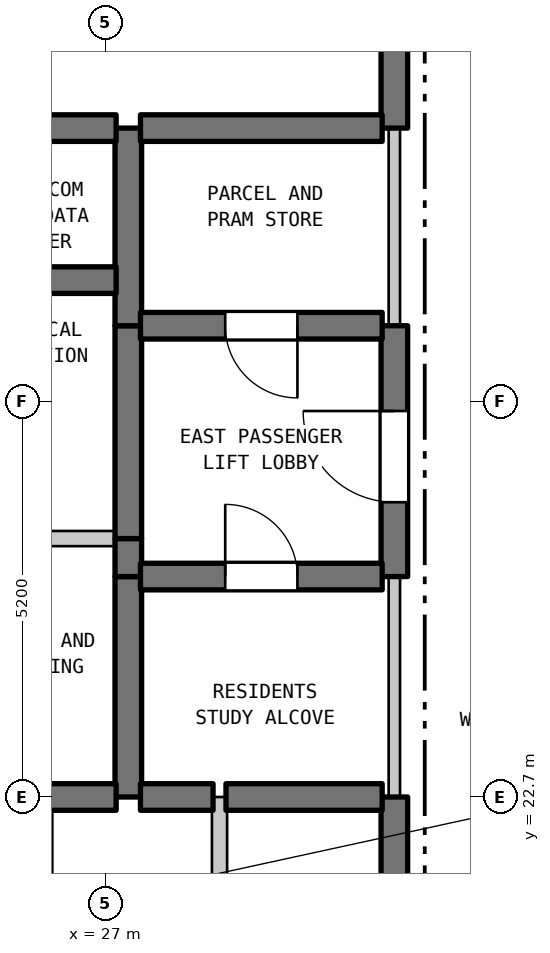
"""IFC4 building model, lengths in metres.
Left out: names, types, materials, properties, quantities, classifications, styles, units other than length and angle.
Written with IfcOpenShell. Run it as: python <this file> out.ifc"""

import sys

from ifc_helpers import new_model, si_unit, direction, frame, frame_2d, origin, place, context, subcontext, project, spatial, rectangle, extrude, element, fill, save


model = new_model("IFC4")
c1 = context("Model", 3, precision=1e-05, world=origin(), true_north=direction((0.0, 1.0)))
c2 = subcontext(c1, "Body", "Model", "MODEL_VIEW")
j1 = project(units=[si_unit("LENGTHUNIT", "METRE"), si_unit("PLANEANGLEUNIT", "RADIAN")], contexts=[c1])
p1 = place(None, origin())
s1 = spatial("IfcSite", under=j1, at=p1, CompositionType="ELEMENT")
p2 = place(p1, origin())
s2 = spatial("IfcBuilding", under=s1, at=p2, CompositionType="ELEMENT")
p3 = place(p2, frame((0.0, 0.0, 251.0)))
s3 = spatial("IfcBuildingStorey", under=s2, at=p3, CompositionType="ELEMENT", Elevation=251.0)
p4 = place(p3, frame((27.3, 22.7, 0.0), z_axis=(0.0, 0.0, 1.0), x_axis=(0.0, 1.0, 0.0)))
e1 = element("IfcWall", 1, at=p4, inside=s3, PredefinedType="SHEAR", context=c2, shape_type="SweptSolid", body=[
    extrude(rectangle(XDim=2.9, YDim=0.35, at=frame_2d((1.45, 0.0))), origin(), (0.0, 0.0, 1.0), 3.39),
])
p5 = place(p3, frame((27.3, 25.6, 0.0), z_axis=(0.0, 0.0, 1.0), x_axis=(0.0, 1.0, 0.0)))
e2 = element("IfcWall", 2, at=p5, inside=s3, PredefinedType="SHEAR", context=c2, shape_type="SweptSolid", body=[
    extrude(rectangle(XDim=0.5, YDim=0.35, at=frame_2d((0.25, 0.0))), origin(), (0.0, 0.0, 1.0), 3.39),
])
p6 = place(p3, frame((27.3, 26.1, 0.0), z_axis=(0.0, 0.0, 1.0), x_axis=(0.0, 1.0, 0.0)))
e3 = element("IfcWall", 3, at=p6, inside=s3, PredefinedType="SHEAR", context=c2, shape_type="SweptSolid", body=[
    extrude(rectangle(XDim=2.8, YDim=0.35, at=frame_2d((1.4, 0.0))), origin(), (0.0, 0.0, 1.0), 3.39),
])
p7 = place(p3, frame((27.3, 28.9, 0.0), z_axis=(0.0, 0.0, 1.0), x_axis=(0.0, 1.0, 0.0)))
e4 = element("IfcWall", 4, at=p7, inside=s3, PredefinedType="SHEAR", context=c2, shape_type="SweptSolid", body=[
    extrude(rectangle(XDim=2.6, YDim=0.35, at=frame_2d((1.3, 0.0))), origin(), (0.0, 0.0, 1.0), 3.39),
])
p8 = place(p3, frame((28.5, 19.5, 0.0), z_axis=(0.0, 0.0, 1.0), x_axis=(0.0, 1.0, 0.0)))
e5 = element("IfcWall", 5, at=p8, inside=s3, PredefinedType="STANDARD", context=c2, shape_type="SweptSolid", body=[
    extrude(rectangle(XDim=3.2, YDim=0.2, at=frame_2d((1.6, 0.0))), origin(), (0.0, 0.0, 1.0), 3.39),
])
p9 = place(p3, frame((30.8, 19.5, 0.0), z_axis=(0.0, 0.0, 1.0), x_axis=(0.0, 1.0, 0.0)))
e6 = element("IfcWall", 6, at=p9, inside=s3, PredefinedType="SHEAR", context=c2, shape_type="SweptSolid", body=[
    extrude(rectangle(XDim=3.2, YDim=0.35, at=frame_2d((1.6, 0.0))), origin(), (0.0, 0.0, 1.0), 3.39),
])
p10 = place(p3, frame((30.8, 22.7, 0.0), z_axis=(0.0, 0.0, 1.0), x_axis=(0.0, 1.0, 0.0)))
e7 = element("IfcWall", 7, at=p10, inside=s3, PredefinedType="STANDARD", context=c2, shape_type="SweptSolid", body=[
    extrude(rectangle(XDim=2.9, YDim=0.15, at=frame_2d((1.45, 0.0))), origin(), (0.0, 0.0, 1.0), 3.39),
])
p11 = place(p3, frame((30.8, 25.6, 0.0), z_axis=(0.0, 0.0, 1.0), x_axis=(0.0, 1.0, 0.0)))
e8 = element("IfcWall", 8, at=p11, inside=s3, PredefinedType="SHEAR", context=c2, shape_type="SweptSolid", body=[
    extrude(rectangle(XDim=3.3, YDim=0.35, at=frame_2d((1.65, 0.0))), origin(), (0.0, 0.0, 1.0), 3.39),
])
p12 = place(p11, frame((0.978, 0.0, 0.0)))
e9 = element("IfcOpeningElement", 9, at=p12, cuts=e8, PredefinedType="OPENING", context=c2, shape_type="SweptSolid", body=[
    extrude(rectangle(XDim=1.2, YDim=2.2, at=frame_2d((0.6, 1.1))), frame((0.0, 0.185, 0.0), z_axis=(0.0, -1.0, 0.0), x_axis=(1.0, 0.0, 0.0)), (0.0, 0.0, 1.0), 0.37),
])
p13 = place(p3, frame((30.8, 28.9, 0.0), z_axis=(0.0, 0.0, 1.0), x_axis=(0.0, 1.0, 0.0)))
e10 = element("IfcWall", 10, at=p13, inside=s3, PredefinedType="STANDARD", context=c2, shape_type="SweptSolid", body=[
    extrude(rectangle(XDim=2.6, YDim=0.15, at=frame_2d((1.3, 0.0))), origin(), (0.0, 0.0, 1.0), 3.39),
])
p14 = place(p3, frame((30.8, 31.5, 0.0), z_axis=(0.0, 0.0, 1.0), x_axis=(0.0, 1.0, 0.0)))
e11 = element("IfcWall", 11, at=p14, inside=s3, PredefinedType="SHEAR", context=c2, shape_type="SweptSolid", body=[
    extrude(rectangle(XDim=3.5, YDim=0.35, at=frame_2d((1.75, 0.0))), origin(), (0.0, 0.0, 1.0), 3.39),
])
p15 = place(p14, frame((1.15, 0.0, 0.0)))
e12 = element("IfcOpeningElement", 12, at=p15, cuts=e11, PredefinedType="OPENING", context=c2, shape_type="SweptSolid", body=[
    extrude(rectangle(XDim=1.2, YDim=2.2, at=frame_2d((0.6, 1.1))), frame((0.0, 0.185, 0.0), z_axis=(0.0, -1.0, 0.0), x_axis=(1.0, 0.0, 0.0)), (0.0, 0.0, 1.0), 0.37),
])
p16 = place(p3, frame((23.96, 22.7, 0.0), z_axis=(0.0, 0.0, 1.0), x_axis=(1.0, 0.0, 0.0)))
e13 = element("IfcWall", 13, at=p16, inside=s3, PredefinedType="SHEAR", context=c2, shape_type="SweptSolid", body=[
    extrude(rectangle(XDim=3.18, YDim=0.35, at=frame_2d((1.59, 0.0))), origin(), (0.0, 0.0, 1.0), 3.39),
])
p17 = place(p3, frame((27.46, 22.7, 0.0), z_axis=(0.0, 0.0, 1.0), x_axis=(1.0, 0.0, 0.0)))
e14 = element("IfcWall", 14, at=p17, inside=s3, PredefinedType="SHEAR", context=c2, shape_type="SweptSolid", body=[
    extrude(rectangle(XDim=0.955, YDim=0.35, at=frame_2d((0.478, 0.0))), origin(), (0.0, 0.0, 1.0), 3.39),
])
p18 = place(p3, frame((28.585, 22.7, 0.0), z_axis=(0.0, 0.0, 1.0), x_axis=(1.0, 0.0, 0.0)))
e15 = element("IfcWall", 15, at=p18, inside=s3, PredefinedType="SHEAR", context=c2, shape_type="SweptSolid", body=[
    extrude(rectangle(XDim=2.055, YDim=0.35, at=frame_2d((1.027, 0.0))), origin(), (0.0, 0.0, 1.0), 3.39),
])
p19 = place(p3, frame((27.46, 25.6, 0.0), z_axis=(0.0, 0.0, 1.0), x_axis=(1.0, 0.0, 0.0)))
e16 = element("IfcWall", 16, at=p19, inside=s3, PredefinedType="SHEAR", context=c2, shape_type="SweptSolid", body=[
    extrude(rectangle(XDim=3.18, YDim=0.35, at=frame_2d((1.59, 0.0))), origin(), (0.0, 0.0, 1.0), 3.39),
])
p20 = place(p19, frame((1.115, 0.0, 0.0)))
e17 = element("IfcOpeningElement", 17, at=p20, cuts=e16, PredefinedType="OPENING", context=c2, shape_type="SweptSolid", body=[
    extrude(rectangle(XDim=0.95, YDim=2.15, at=frame_2d((0.475, 1.075))), frame((0.0, 0.185, 0.0), z_axis=(0.0, -1.0, 0.0), x_axis=(1.0, 0.0, 0.0)), (0.0, 0.0, 1.0), 0.37),
])
p21 = place(p3, frame((23.96, 26.1, 0.0), z_axis=(0.0, 0.0, 1.0), x_axis=(1.0, 0.0, 0.0)))
e18 = element("IfcWall", 18, at=p21, inside=s3, PredefinedType="STANDARD", context=c2, shape_type="SweptSolid", body=[
    extrude(rectangle(XDim=3.18, YDim=0.2, at=frame_2d((1.59, 0.0))), origin(), (0.0, 0.0, 1.0), 3.39),
])
p22 = place(p3, frame((27.46, 28.9, 0.0), z_axis=(0.0, 0.0, 1.0), x_axis=(1.0, 0.0, 0.0)))
e19 = element("IfcWall", 19, at=p22, inside=s3, PredefinedType="SHEAR", context=c2, shape_type="SweptSolid", body=[
    extrude(rectangle(XDim=3.18, YDim=0.35, at=frame_2d((1.59, 0.0))), origin(), (0.0, 0.0, 1.0), 3.39),
])
p23 = place(p22, frame((1.115, 0.0, 0.0)))
e20 = element("IfcOpeningElement", 20, at=p23, cuts=e19, PredefinedType="OPENING", context=c2, shape_type="SweptSolid", body=[
    extrude(rectangle(XDim=0.95, YDim=2.15, at=frame_2d((0.475, 1.075))), frame((0.0, 0.185, 0.0), z_axis=(0.0, -1.0, 0.0), x_axis=(1.0, 0.0, 0.0)), (0.0, 0.0, 1.0), 0.37),
])
p24 = place(p3, frame((23.96, 29.5, 0.0), z_axis=(0.0, 0.0, 1.0), x_axis=(1.0, 0.0, 0.0)))
e21 = element("IfcWall", 21, at=p24, inside=s3, PredefinedType="SHEAR", context=c2, shape_type="SweptSolid", body=[
    extrude(rectangle(XDim=3.18, YDim=0.35, at=frame_2d((1.59, 0.0))), origin(), (0.0, 0.0, 1.0), 3.39),
])
p25 = place(p3, frame((23.96, 31.5, 0.0), z_axis=(0.0, 0.0, 1.0), x_axis=(1.0, 0.0, 0.0)))
e22 = element("IfcWall", 22, at=p25, inside=s3, PredefinedType="SHEAR", context=c2, shape_type="SweptSolid", body=[
    extrude(rectangle(XDim=3.18, YDim=0.35, at=frame_2d((1.59, 0.0))), origin(), (0.0, 0.0, 1.0), 3.39),
])
p26 = place(p25, frame((1.094, 0.0, 0.0)))
e23 = element("IfcOpeningElement", 23, at=p26, cuts=e22, PredefinedType="OPENING", context=c2, shape_type="SweptSolid", body=[
    extrude(rectangle(XDim=0.85, YDim=2.1, at=frame_2d((0.425, 1.05))), frame((0.0, 0.185, 0.0), z_axis=(0.0, -1.0, 0.0), x_axis=(1.0, 0.0, 0.0)), (0.0, 0.0, 1.0), 0.37),
])
p27 = place(p3, frame((27.46, 31.5, 0.0), z_axis=(0.0, 0.0, 1.0), x_axis=(1.0, 0.0, 0.0)))
e24 = element("IfcWall", 24, at=p27, inside=s3, PredefinedType="SHEAR", context=c2, shape_type="SweptSolid", body=[
    extrude(rectangle(XDim=3.18, YDim=0.35, at=frame_2d((1.59, 0.0))), origin(), (0.0, 0.0, 1.0), 3.39),
])
p28 = place(p12, origin())
e25 = element("IfcDoor", 25, at=p28, inside=s3, OperationType="SINGLE_SWING_RIGHT", PredefinedType="DOOR", context=c2, shape_type="SweptSolid", body=[
    extrude(rectangle(XDim=1.2, YDim=2.2, at=frame_2d((0.6, 1.1))), frame((0.0, 0.025, 0.0), z_axis=(0.0, -1.0, 0.0), x_axis=(1.0, 0.0, 0.0)), (0.0, 0.0, 1.0), 0.05),
])
fill(e9, e25)
p29 = place(p20, origin())
e26 = element("IfcDoor", 26, at=p29, inside=s3, OperationType="SINGLE_SWING_LEFT", PredefinedType="DOOR", context=c2, shape_type="SweptSolid", body=[
    extrude(rectangle(XDim=0.95, YDim=2.15, at=frame_2d((0.475, 1.075))), frame((0.0, 0.025, 0.0), z_axis=(0.0, -1.0, 0.0), x_axis=(1.0, 0.0, 0.0)), (0.0, 0.0, 1.0), 0.05),
])
fill(e17, e26)
p30 = place(p23, frame((0.95, 0.0, 0.0), z_axis=(0.0, 0.0, 1.0), x_axis=(-1.0, 0.0, 0.0)))
e27 = element("IfcDoor", 27, at=p30, inside=s3, OperationType="SINGLE_SWING_RIGHT", PredefinedType="DOOR", context=c2, shape_type="SweptSolid", body=[
    extrude(rectangle(XDim=0.95, YDim=2.15, at=frame_2d((0.475, 1.075))), frame((0.0, 0.025, 0.0), z_axis=(0.0, -1.0, 0.0), x_axis=(1.0, 0.0, 0.0)), (0.0, 0.0, 1.0), 0.05),
])
fill(e20, e27)
save(model, sys.argv[1])
